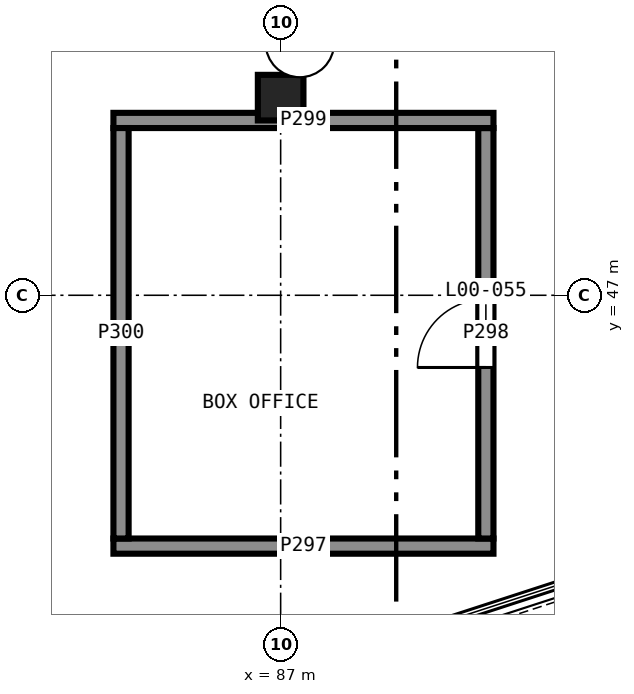
"""IFC4 building model, lengths in metres.
Left out: names, types, materials, properties, quantities, classifications, styles, units other than length and angle.
Written with IfcOpenShell. Run it as: python <this file> out.ifc"""

import sys

from ifc_helpers import new_model, si_unit, direction, frame, frame_2d, origin, origin_2d, place, context, subcontext, project, spatial, rectangle, extrude, element, fill, save


model = new_model("IFC4")
c1 = context("Model", 3, precision=1e-05, world=origin(), true_north=direction((0.0, 1.0)))
c2 = subcontext(c1, "Body", "Model", "MODEL_VIEW")
j1 = project(units=[si_unit("LENGTHUNIT", "METRE"), si_unit("PLANEANGLEUNIT", "RADIAN")], contexts=[c1])
p1 = place(None, origin())
s1 = spatial("IfcSite", under=j1, at=p1, CompositionType="ELEMENT")
p2 = place(p1, origin())
s2 = spatial("IfcBuilding", under=s1, at=p2, CompositionType="ELEMENT")
p3 = place(p2, origin())
s3 = spatial("IfcBuildingStorey", under=s2, at=p3, CompositionType="ELEMENT", Elevation=0.0)
p4 = place(p3, frame((87.0, 49.6, 0.0), z_axis=(0.0, 0.0, 1.0), x_axis=(1.0, 0.0, 0.0)))
e1 = element("IfcColumn", 1, at=p4, inside=s3, PredefinedType="COLUMN", context=c2, shape_type="SweptSolid", body=[
    extrude(rectangle(XDim=0.6, YDim=0.6, at=origin_2d()), origin(), (0.0, 0.0, 1.0), 5.5),
])
p5 = place(p3, frame((84.8, 43.7, 0.0), z_axis=(0.0, 0.0, 1.0), x_axis=(1.0, 0.0, 0.0)))
e2 = element("IfcWall", 2, at=p5, inside=s3, PredefinedType="PARTITIONING", context=c2, shape_type="SweptSolid", body=[
    extrude(rectangle(XDim=5.0, YDim=0.2, at=frame_2d((2.5, 0.0))), origin(), (0.0, 0.0, 1.0), 5.2),
])
p6 = place(p3, frame((89.7, 43.8, 0.0), z_axis=(0.0, 0.0, 1.0), x_axis=(0.0, 1.0, 0.0)))
e3 = element("IfcWall", 3, at=p6, inside=s3, PredefinedType="PARTITIONING", context=c2, shape_type="SweptSolid", body=[
    extrude(rectangle(XDim=5.4, YDim=0.2, at=frame_2d((2.7, 0.0))), origin(), (0.0, 0.0, 1.0), 5.2),
])
p7 = place(p6, frame((2.25, 0.0, 0.0)))
e4 = element("IfcOpeningElement", 4, at=p7, cuts=e3, PredefinedType="OPENING", context=c2, shape_type="SweptSolid", body=[
    extrude(rectangle(XDim=0.9, YDim=2.1, at=frame_2d((0.45, 1.05))), frame((0.0, 0.11, 0.0), z_axis=(0.0, -1.0, 0.0), x_axis=(1.0, 0.0, 0.0)), (0.0, 0.0, 1.0), 0.22),
])
p8 = place(p3, frame((89.8, 49.3, 0.0), z_axis=(0.0, 0.0, 1.0), x_axis=(-1.0, 0.0, 0.0)))
e5 = element("IfcWall", 5, at=p8, inside=s3, PredefinedType="PARTITIONING", context=c2, shape_type="SweptSolid", body=[
    extrude(rectangle(XDim=5.0, YDim=0.2, at=frame_2d((2.5, 0.0))), origin(), (0.0, 0.0, 1.0), 5.2),
])
p9 = place(p3, frame((84.9, 49.2, 0.0), z_axis=(0.0, 0.0, 1.0), x_axis=(0.0, -1.0, 0.0)))
e6 = element("IfcWall", 6, at=p9, inside=s3, PredefinedType="PARTITIONING", context=c2, shape_type="SweptSolid", body=[
    extrude(rectangle(XDim=5.4, YDim=0.2, at=frame_2d((2.7, 0.0))), origin(), (0.0, 0.0, 1.0), 5.2),
])
p10 = place(p7, origin())
e7 = element("IfcDoor", 7, at=p10, inside=s3, OperationType="SINGLE_SWING_RIGHT", PredefinedType="DOOR", context=c2, shape_type="SweptSolid", body=[
    extrude(rectangle(XDim=0.9, YDim=2.1, at=frame_2d((0.45, 1.05))), frame((0.0, 0.025, 0.0), z_axis=(0.0, -1.0, 0.0), x_axis=(1.0, 0.0, 0.0)), (0.0, 0.0, 1.0), 0.05),
])
fill(e4, e7)
save(model, sys.argv[1])
